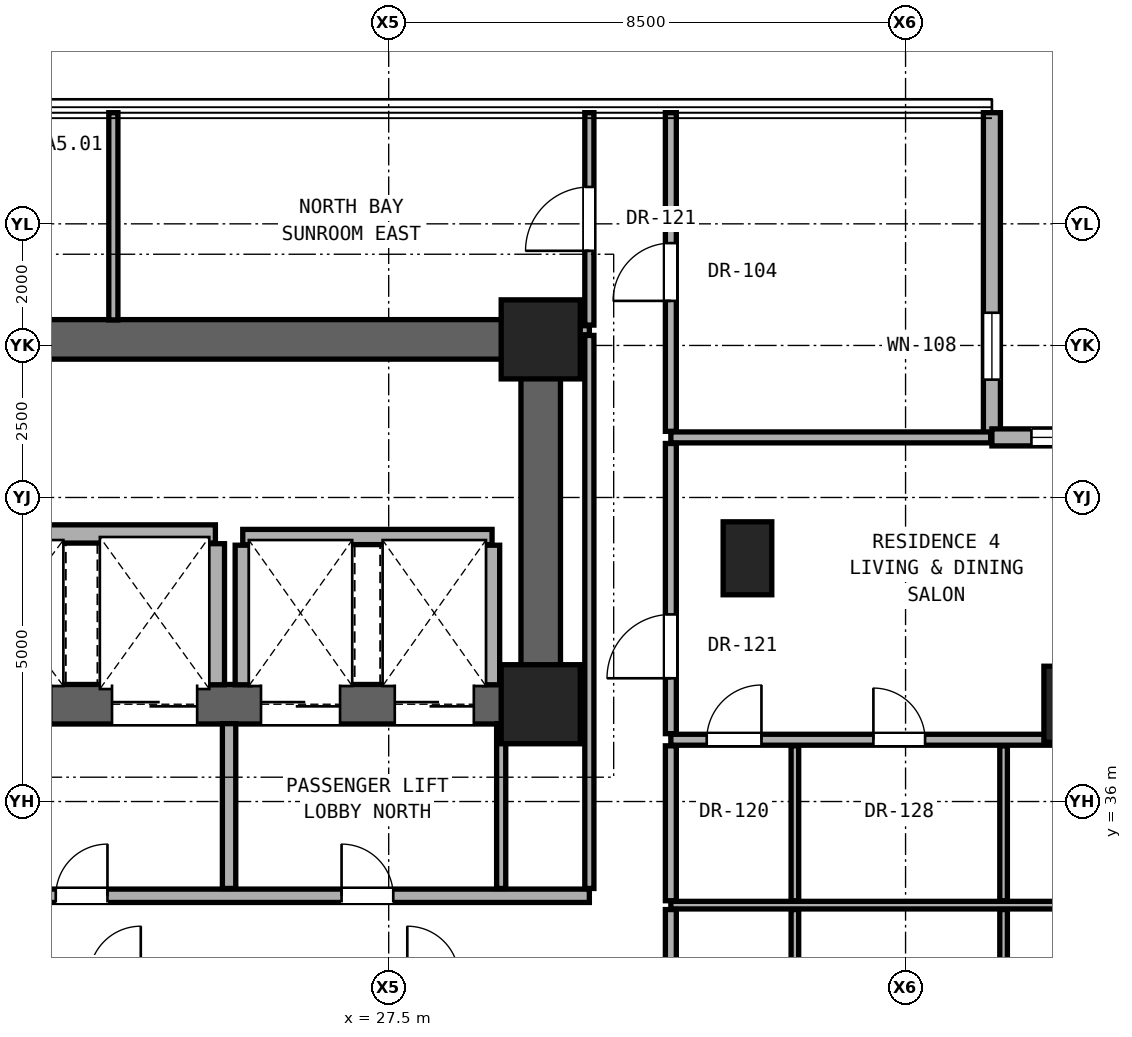
"""IFC4 building model, lengths in metres.
Left out: names, types, materials, properties, quantities, classifications, styles, units other than length and angle.
Written with IfcOpenShell. Run it as: python <this file> out.ifc"""

import sys

from ifc_helpers import new_model, si_unit, direction, frame, frame_2d, origin, origin_2d, place, context, subcontext, project, spatial, rectangle, hollow_rectangle, extrude, element, fill, save


model = new_model("IFC4")
c1 = context("Model", 3, precision=1e-05, world=origin(), true_north=direction((0.0, 1.0)))
c2 = subcontext(c1, "Body", "Model", "MODEL_VIEW")
j1 = project(units=[si_unit("LENGTHUNIT", "METRE"), si_unit("PLANEANGLEUNIT", "RADIAN")], contexts=[c1])
p1 = place(None, origin())
s1 = spatial("IfcSite", under=j1, at=p1, CompositionType="ELEMENT")
p2 = place(p1, origin())
s2 = spatial("IfcBuilding", under=s1, at=p2, CompositionType="ELEMENT")
p3 = place(p2, frame((0.0, 0.0, 71.9)))
s3 = spatial("IfcBuildingStorey", under=s2, at=p3, CompositionType="ELEMENT", Elevation=71.9)
for number, where, z_axis, x_axis in (
    (1, (30.0, 37.6, 0.0), (0.0, 0.0, 1.0), (1.0, 0.0, 0.0)),
    (2, (30.0, 43.6, 0.0), (0.0, 0.0, 1.0), (1.0, 0.0, 0.0)),
):
    element("IfcColumn", number, at=place(p3, frame(where, z_axis=z_axis, x_axis=x_axis)), inside=s3, PredefinedType="COLUMN", context=c2, shape_type="SweptSolid", body=[
        extrude(rectangle(XDim=1.3, YDim=1.3, at=origin_2d()), origin(), (0.0, 0.0, 1.0), 3.3),
    ])
p4 = place(p3, frame((38.9, 37.6, 0.0), z_axis=(0.0, 0.0, 1.0), x_axis=(1.0, 0.0, 0.0)))
e3 = element("IfcColumn", 3, at=p4, inside=s3, PredefinedType="COLUMN", context=c2, shape_type="SweptSolid", body=[
    extrude(hollow_rectangle(XDim=1.25, YDim=1.25, WallThickness=0.07, at=origin_2d()), origin(), (0.0, 0.0, 1.0), 3.3),
])
p5 = place(p3, frame((33.4, 40.0, 0.0), z_axis=(0.0, 0.0, 1.0), x_axis=(1.0, 0.0, 0.0)))
e4 = element("IfcColumn", 4, at=p5, inside=s3, PredefinedType="PILASTER", context=c2, shape_type="SweptSolid", body=[
    extrude(rectangle(XDim=0.8, YDim=1.2, at=origin_2d()), origin(), (0.0, 0.0, 1.0), 3.3),
])
p6 = place(p3, frame((11.0, 43.6, 0.0), z_axis=(0.0, 0.0, 1.0), x_axis=(1.0, 0.0, 0.0)))
e5 = element("IfcWall", 5, at=p6, inside=s3, PredefinedType="SHEAR", context=c2, shape_type="SweptSolid", body=[
    extrude(rectangle(XDim=19.0, YDim=0.65, at=frame_2d((9.5, 0.0))), origin(), (0.0, 0.0, 1.0), 3.06),
])
p7 = place(p3, frame((30.0, 37.6, 0.0), z_axis=(0.0, 0.0, 1.0), x_axis=(0.0, 1.0, 0.0)))
e6 = element("IfcWall", 6, at=p7, inside=s3, PredefinedType="SHEAR", context=c2, shape_type="SweptSolid", body=[
    extrude(rectangle(XDim=6.0, YDim=0.65, at=frame_2d((3.0, 0.0))), origin(), (0.0, 0.0, 1.0), 3.06),
])
p8 = place(p3, frame((11.0, 37.6, 0.0), z_axis=(0.0, 0.0, 1.0), x_axis=(1.0, 0.0, 0.0)))
e7 = element("IfcWall", 7, at=p8, inside=s3, PredefinedType="SHEAR", context=c2, shape_type="SweptSolid", body=[
    extrude(rectangle(XDim=19.0, YDim=0.65, at=frame_2d((9.5, 0.0))), origin(), (0.0, 0.0, 1.0), 3.06),
])
p9 = place(p8, frame((1.06, 0.0, 0.0)))
e8 = element("IfcOpeningElement", 8, at=p9, cuts=e7, PredefinedType="OPENING", context=c2, shape_type="SweptSolid", body=[
    extrude(rectangle(XDim=1.15, YDim=2.2, at=frame_2d((0.575, 1.1))), frame((0.0, 0.335, 0.0), z_axis=(0.0, -1.0, 0.0), x_axis=(1.0, 0.0, 0.0)), (0.0, 0.0, 1.0), 0.67),
])
p10 = place(p8, frame((9.55, 0.0, 0.0)))
e9 = element("IfcOpeningElement", 9, at=p10, cuts=e7, PredefinedType="OPENING", context=c2, shape_type="SweptSolid", body=[
    extrude(rectangle(XDim=1.4, YDim=2.35, at=frame_2d((0.7, 1.175))), frame((0.0, 0.335, 0.0), z_axis=(0.0, -1.0, 0.0), x_axis=(1.0, 0.0, 0.0)), (0.0, 0.0, 1.0), 0.67),
])
p11 = place(p8, frame((11.95, 0.0, 0.0)))
e10 = element("IfcOpeningElement", 10, at=p11, cuts=e7, PredefinedType="OPENING", context=c2, shape_type="SweptSolid", body=[
    extrude(rectangle(XDim=1.4, YDim=2.35, at=frame_2d((0.7, 1.175))), frame((0.0, 0.335, 0.0), z_axis=(0.0, -1.0, 0.0), x_axis=(1.0, 0.0, 0.0)), (0.0, 0.0, 1.0), 0.67),
])
p12 = place(p8, frame((14.4, 0.0, 0.0)))
e11 = element("IfcOpeningElement", 11, at=p12, cuts=e7, PredefinedType="OPENING", context=c2, shape_type="SweptSolid", body=[
    extrude(rectangle(XDim=1.3, YDim=2.3, at=frame_2d((0.65, 1.15))), frame((0.0, 0.335, 0.0), z_axis=(0.0, -1.0, 0.0), x_axis=(1.0, 0.0, 0.0)), (0.0, 0.0, 1.0), 0.67),
])
p13 = place(p8, frame((16.6, 0.0, 0.0)))
e12 = element("IfcOpeningElement", 12, at=p13, cuts=e7, PredefinedType="OPENING", context=c2, shape_type="SweptSolid", body=[
    extrude(rectangle(XDim=1.3, YDim=2.3, at=frame_2d((0.65, 1.15))), frame((0.0, 0.335, 0.0), z_axis=(0.0, -1.0, 0.0), x_axis=(1.0, 0.0, 0.0)), (0.0, 0.0, 1.0), 0.67),
])
p14 = place(p3, frame((37.42, 41.988, 0.0), z_axis=(0.0, 0.0, 1.0), x_axis=(0.0, 1.0, 0.0)))
e13 = element("IfcWall", 13, at=p14, inside=s3, PredefinedType="SOLIDWALL", context=c2, shape_type="SweptSolid", body=[
    extrude(rectangle(XDim=5.34, YDim=0.28, at=frame_2d((2.67, 0.0))), origin(), (0.0, 0.0, 1.0), 3.04),
])
p15 = place(p14, frame((0.95, 0.0, 0.85)))
e14 = element("IfcOpeningElement", 14, at=p15, cuts=e13, PredefinedType="OPENING", context=c2, shape_type="SweptSolid", body=[
    extrude(rectangle(XDim=1.1, YDim=2.0, at=frame_2d((0.55, 1.0))), frame((0.0, 0.15, 0.0), z_axis=(0.0, -1.0, 0.0), x_axis=(1.0, 0.0, 0.0)), (0.0, 0.0, 1.0), 0.3),
])
p16 = place(p3, frame((42.76, 41.988, 0.0), z_axis=(0.0, 0.0, 1.0), x_axis=(-1.0, 0.0, 0.0)))
e15 = element("IfcWall", 15, at=p16, inside=s3, PredefinedType="SOLIDWALL", context=c2, shape_type="SweptSolid", body=[
    extrude(rectangle(XDim=5.34, YDim=0.28, at=frame_2d((2.67, 0.0))), origin(), (0.0, 0.0, 1.0), 3.04),
])
p17 = place(p16, frame((3.59, 0.0, 0.85)))
e16 = element("IfcOpeningElement", 16, at=p17, cuts=e15, PredefinedType="OPENING", context=c2, shape_type="SweptSolid", body=[
    extrude(rectangle(XDim=1.1, YDim=2.0, at=frame_2d((0.55, 1.0))), frame((0.0, 0.15, 0.0), z_axis=(0.0, -1.0, 0.0), x_axis=(1.0, 0.0, 0.0)), (0.0, 0.0, 1.0), 0.3),
])
p18 = place(p3, frame((32.14, 34.296, 0.0), z_axis=(0.0, 0.0, 1.0), x_axis=(1.0, 0.0, 0.0)))
e17 = element("IfcWall", 17, at=p18, inside=s3, PredefinedType="PARTITIONING", context=c2, shape_type="SweptSolid", body=[
    extrude(rectangle(XDim=10.62, YDim=0.125, at=frame_2d((5.31, 0.0))), origin(), (0.0, 0.0, 1.0), 2.125),
])
p19 = place(p3, frame((15.59, 34.45, 0.0), z_axis=(0.0, 0.0, 1.0), x_axis=(1.0, 0.0, 0.0)))
e18 = element("IfcWall", 18, at=p19, inside=s3, PredefinedType="SOLIDWALL", context=c2, shape_type="SweptSolid", body=[
    extrude(rectangle(XDim=15.21, YDim=0.22, at=frame_2d((7.605, 0.0))), origin(), (0.0, 0.0, 1.0), 2.104),
])
p20 = place(p19, frame((6.435, 0.0, 0.0)))
e19 = element("IfcOpeningElement", 19, at=p20, cuts=e18, PredefinedType="OPENING", context=c2, shape_type="SweptSolid", body=[
    extrude(rectangle(XDim=0.85, YDim=2.01, at=frame_2d((0.425, 1.005))), frame((0.0, 0.12, 0.0), z_axis=(0.0, -1.0, 0.0), x_axis=(1.0, 0.0, 0.0)), (0.0, 0.0, 1.0), 0.24),
])
p21 = place(p19, frame((11.135, 0.0, 0.0)))
e20 = element("IfcOpeningElement", 20, at=p21, cuts=e18, PredefinedType="OPENING", context=c2, shape_type="SweptSolid", body=[
    extrude(rectangle(XDim=0.85, YDim=2.01, at=frame_2d((0.425, 1.005))), frame((0.0, 0.12, 0.0), z_axis=(0.0, -1.0, 0.0), x_axis=(1.0, 0.0, 0.0)), (0.0, 0.0, 1.0), 0.24),
])
p22 = place(p19, frame((0.675, 0.0, 0.0)))
e21 = element("IfcOpeningElement", 21, at=p22, cuts=e18, PredefinedType="OPENING", context=c2, shape_type="SweptSolid", body=[
    extrude(rectangle(XDim=0.85, YDim=2.01, at=frame_2d((0.425, 1.005))), frame((0.0, 0.12, 0.0), z_axis=(0.0, -1.0, 0.0), x_axis=(1.0, 0.0, 0.0)), (0.0, 0.0, 1.0), 0.24),
])
p23 = place(p19, frame((2.835, 0.0, 0.0)))
e22 = element("IfcOpeningElement", 22, at=p23, cuts=e18, PredefinedType="OPENING", context=c2, shape_type="SweptSolid", body=[
    extrude(rectangle(XDim=0.85, YDim=2.01, at=frame_2d((0.425, 1.005))), frame((0.0, 0.12, 0.0), z_axis=(0.0, -1.0, 0.0), x_axis=(1.0, 0.0, 0.0)), (0.0, 0.0, 1.0), 0.24),
])
p24 = place(p3, frame((32.14, 37.016, 0.0), z_axis=(0.0, 0.0, 1.0), x_axis=(1.0, 0.0, 0.0)))
e23 = element("IfcWall", 23, at=p24, inside=s3, PredefinedType="PARTITIONING", context=c2, shape_type="SweptSolid", body=[
    extrude(rectangle(XDim=10.62, YDim=0.18, at=frame_2d((5.31, 0.0))), origin(), (0.0, 0.0, 1.0), 2.125),
])
p25 = place(p24, frame((7.601, 0.0, 0.0)))
e24 = element("IfcOpeningElement", 24, at=p25, cuts=e23, PredefinedType="OPENING", context=c2, shape_type="SweptSolid", body=[
    extrude(rectangle(XDim=0.85, YDim=2.01, at=frame_2d((0.425, 1.005))), frame((0.0, 0.1, 0.0), z_axis=(0.0, -1.0, 0.0), x_axis=(1.0, 0.0, 0.0)), (0.0, 0.0, 1.0), 0.2),
])
p26 = place(p24, frame((3.331, 0.0, 0.0)))
e25 = element("IfcOpeningElement", 25, at=p26, cuts=e23, PredefinedType="OPENING", context=c2, shape_type="SweptSolid", body=[
    extrude(rectangle(XDim=0.85, YDim=2.01, at=frame_2d((0.425, 1.005))), frame((0.0, 0.1, 0.0), z_axis=(0.0, -1.0, 0.0), x_axis=(1.0, 0.0, 0.0)), (0.0, 0.0, 1.0), 0.2),
])
p27 = place(p24, frame((0.59, 0.0, 0.0)))
e26 = element("IfcOpeningElement", 26, at=p27, cuts=e23, PredefinedType="OPENING", context=c2, shape_type="SweptSolid", body=[
    extrude(rectangle(XDim=0.9, YDim=2.1, at=frame_2d((0.45, 1.05))), frame((0.0, 0.1, 0.0), z_axis=(0.0, -1.0, 0.0), x_axis=(1.0, 0.0, 0.0)), (0.0, 0.0, 1.0), 0.2),
])
p28 = place(p3, frame((25.1, 40.35, 0.0), z_axis=(0.0, 0.0, 1.0), x_axis=(1.0, 0.0, 0.0)))
e27 = element("IfcWall", 27, at=p28, inside=s3, PredefinedType="SOLIDWALL", context=c2, shape_type="SweptSolid", body=[
    extrude(rectangle(XDim=4.1, YDim=0.25, at=frame_2d((2.05, 0.0))), origin(), (0.0, 0.0, 1.0), 3.06),
])
p29 = place(p3, frame((20.25, 40.4, 0.0), z_axis=(0.0, 0.0, 1.0), x_axis=(1.0, 0.0, 0.0)))
e28 = element("IfcWall", 28, at=p29, inside=s3, PredefinedType="SOLIDWALL", context=c2, shape_type="SweptSolid", body=[
    extrude(rectangle(XDim=4.4, YDim=0.3, at=frame_2d((2.2, 0.0))), origin(), (0.0, 0.0, 1.0), 3.06),
])
p30 = place(p3, frame((32.14, 41.988, 0.0), z_axis=(0.0, 0.0, 1.0), x_axis=(1.0, 0.0, 0.0)))
e29 = element("IfcWall", 29, at=p30, inside=s3, PredefinedType="PARTITIONING", context=c2, shape_type="SweptSolid", body=[
    extrude(rectangle(XDim=5.26, YDim=0.18, at=frame_2d((2.63, 0.0))), origin(), (0.0, 0.0, 1.0), 3.06),
])
p31 = place(p3, frame((30.32, 43.75, 0.0), z_axis=(0.0, 0.0, 1.0), x_axis=(1.0, 0.0, 0.0)))
e30 = element("IfcWall", 30, at=p31, inside=s3, PredefinedType="PARTITIONING", context=c2, shape_type="SweptSolid", body=[
    extrude(rectangle(XDim=0.48, YDim=0.15, at=frame_2d((0.24, 0.0))), origin(), (0.0, 0.0, 1.0), 3.06),
])
p32 = place(p3, frame((22.972, 43.92, 0.0), z_axis=(0.0, 0.0, 1.0), x_axis=(0.0, 1.0, 0.0)))
e31 = element("IfcWall", 31, at=p32, inside=s3, PredefinedType="PARTITIONING", context=c2, shape_type="SweptSolid", body=[
    extrude(rectangle(XDim=3.408, YDim=0.15, at=frame_2d((1.704, 0.0))), origin(), (0.0, 0.0, 1.0), 3.06),
])
p33 = place(p3, frame((24.65, 37.92, 0.0), z_axis=(0.0, 0.0, 1.0), x_axis=(0.0, 1.0, 0.0)))
e32 = element("IfcWall", 32, at=p33, inside=s3, PredefinedType="SOLIDWALL", context=c2, shape_type="SweptSolid", body=[
    extrude(rectangle(XDim=2.32, YDim=0.3, at=frame_2d((1.16, 0.0))), origin(), (0.0, 0.0, 1.0), 3.06),
])
p34 = place(p3, frame((24.875, 34.57, 0.0), z_axis=(0.0, 0.0, 1.0), x_axis=(0.0, 1.0, 0.0)))
e33 = element("IfcWall", 33, at=p34, inside=s3, PredefinedType="SOLIDWALL", context=c2, shape_type="SweptSolid", body=[
    extrude(rectangle(XDim=2.71, YDim=0.22, at=frame_2d((1.355, 0.0))), origin(), (0.0, 0.0, 1.0), 3.06),
])
p35 = place(p3, frame((25.1, 37.92, 0.0), z_axis=(0.0, 0.0, 1.0), x_axis=(0.0, 1.0, 0.0)))
e34 = element("IfcWall", 34, at=p35, inside=s3, PredefinedType="SOLIDWALL", context=c2, shape_type="SweptSolid", body=[
    extrude(rectangle(XDim=2.295, YDim=0.25, at=frame_2d((1.147, 0.0))), origin(), (0.0, 0.0, 1.0), 3.06),
])
p36 = place(p3, frame((29.35, 34.57, 0.0), z_axis=(0.0, 0.0, 1.0), x_axis=(0.0, 1.0, 0.0)))
e35 = element("IfcWall", 35, at=p36, inside=s3, PredefinedType="PARTITIONING", context=c2, shape_type="SweptSolid", body=[
    extrude(rectangle(XDim=2.71, YDim=0.15, at=frame_2d((1.355, 0.0))), origin(), (0.0, 0.0, 1.0), 3.06),
])
p37 = place(p3, frame((29.2, 37.92, 0.0), z_axis=(0.0, 0.0, 1.0), x_axis=(0.0, 1.0, 0.0)))
e36 = element("IfcWall", 36, at=p37, inside=s3, PredefinedType="SOLIDWALL", context=c2, shape_type="SweptSolid", body=[
    extrude(rectangle(XDim=2.295, YDim=0.25, at=frame_2d((1.147, 0.0))), origin(), (0.0, 0.0, 1.0), 3.06),
])
p38 = place(p3, frame((30.8, 34.57, 0.0), z_axis=(0.0, 0.0, 1.0), x_axis=(0.0, 1.0, 0.0)))
e37 = element("IfcWall", 37, at=p38, inside=s3, PredefinedType="PARTITIONING", context=c2, shape_type="SweptSolid", body=[
    extrude(rectangle(XDim=9.095, YDim=0.15, at=frame_2d((4.547, 0.0))), origin(), (0.0, 0.0, 1.0), 2.436),
])
p39 = place(p3, frame((30.8, 43.835, 0.0), z_axis=(0.0, 0.0, 1.0), x_axis=(0.0, 1.0, 0.0)))
e38 = element("IfcWall", 38, at=p39, inside=s3, PredefinedType="PARTITIONING", context=c2, shape_type="SweptSolid", body=[
    extrude(rectangle(XDim=3.493, YDim=0.15, at=frame_2d((1.747, 0.0))), origin(), (0.0, 0.0, 1.0), 3.06),
])
p40 = place(p39, frame((1.221, 0.0, 0.0)))
e39 = element("IfcOpeningElement", 39, at=p40, cuts=e38, PredefinedType="OPENING", context=c2, shape_type="SweptSolid", body=[
    extrude(rectangle(XDim=1.05, YDim=2.2, at=frame_2d((0.525, 1.1))), frame((0.0, 0.085, 0.0), z_axis=(0.0, -1.0, 0.0), x_axis=(1.0, 0.0, 0.0)), (0.0, 0.0, 1.0), 0.17),
])
p41 = place(p3, frame((32.14, 32.476, 0.0), z_axis=(0.0, 0.0, 1.0), x_axis=(0.0, 1.0, 0.0)))
e40 = element("IfcWall", 40, at=p41, inside=s3, PredefinedType="PARTITIONING", context=c2, shape_type="SweptSolid", body=[
    extrude(rectangle(XDim=1.747, YDim=0.18, at=frame_2d((0.874, 0.0))), origin(), (0.0, 0.0, 1.0), 3.06),
])
p42 = place(p3, frame((32.14, 34.368, 0.0), z_axis=(0.0, 0.0, 1.0), x_axis=(0.0, 1.0, 0.0)))
e41 = element("IfcWall", 41, at=p42, inside=s3, PredefinedType="PARTITIONING", context=c2, shape_type="SweptSolid", body=[
    extrude(rectangle(XDim=2.548, YDim=0.18, at=frame_2d((1.274, 0.0))), origin(), (0.0, 0.0, 1.0), 3.06),
])
p43 = place(p3, frame((32.14, 37.116, 0.0), z_axis=(0.0, 0.0, 1.0), x_axis=(0.0, 1.0, 0.0)))
e42 = element("IfcWall", 42, at=p43, inside=s3, PredefinedType="PARTITIONING", context=c2, shape_type="SweptSolid", body=[
    extrude(rectangle(XDim=4.772, YDim=0.18, at=frame_2d((2.386, 0.0))), origin(), (0.0, 0.0, 1.0), 2.436),
])
p44 = place(p43, frame((0.911, 0.0, 0.0)))
e43 = element("IfcOpeningElement", 43, at=p44, cuts=e42, PredefinedType="OPENING", context=c2, shape_type="SweptSolid", body=[
    extrude(rectangle(XDim=1.05, YDim=2.2, at=frame_2d((0.525, 1.1))), frame((0.0, 0.1, 0.0), z_axis=(0.0, -1.0, 0.0), x_axis=(1.0, 0.0, 0.0)), (0.0, 0.0, 1.0), 0.2),
])
p45 = place(p3, frame((32.14, 42.088, 0.0), z_axis=(0.0, 0.0, 1.0), x_axis=(0.0, 1.0, 0.0)))
e44 = element("IfcWall", 44, at=p45, inside=s3, PredefinedType="PARTITIONING", context=c2, shape_type="SweptSolid", body=[
    extrude(rectangle(XDim=5.24, YDim=0.18, at=frame_2d((2.62, 0.0))), origin(), (0.0, 0.0, 1.0), 3.06),
])
p46 = place(p45, frame((2.145, 0.0, 0.0)))
e45 = element("IfcOpeningElement", 45, at=p46, cuts=e44, PredefinedType="OPENING", context=c2, shape_type="SweptSolid", body=[
    extrude(rectangle(XDim=0.95, YDim=2.15, at=frame_2d((0.475, 1.075))), frame((0.0, 0.1, 0.0), z_axis=(0.0, -1.0, 0.0), x_axis=(1.0, 0.0, 0.0)), (0.0, 0.0, 1.0), 0.2),
])
p47 = place(p3, frame((34.18, 32.476, 0.0), z_axis=(0.0, 0.0, 1.0), x_axis=(0.0, 1.0, 0.0)))
e46 = element("IfcWall", 46, at=p47, inside=s3, PredefinedType="PARTITIONING", context=c2, shape_type="SweptSolid", body=[
    extrude(rectangle(XDim=1.747, YDim=0.125, at=frame_2d((0.874, 0.0))), origin(), (0.0, 0.0, 1.0), 3.06),
])
p48 = place(p3, frame((34.18, 34.368, 0.0), z_axis=(0.0, 0.0, 1.0), x_axis=(0.0, 1.0, 0.0)))
e47 = element("IfcWall", 47, at=p48, inside=s3, PredefinedType="PARTITIONING", context=c2, shape_type="SweptSolid", body=[
    extrude(rectangle(XDim=2.548, YDim=0.125, at=frame_2d((1.274, 0.0))), origin(), (0.0, 0.0, 1.0), 3.06),
])
p49 = place(p3, frame((37.612, 32.476, 0.0), z_axis=(0.0, 0.0, 1.0), x_axis=(0.0, 1.0, 0.0)))
e48 = element("IfcWall", 48, at=p49, inside=s3, PredefinedType="PARTITIONING", context=c2, shape_type="SweptSolid", body=[
    extrude(rectangle(XDim=1.747, YDim=0.125, at=frame_2d((0.874, 0.0))), origin(), (0.0, 0.0, 1.0), 3.06),
])
p50 = place(p3, frame((37.612, 34.368, 0.0), z_axis=(0.0, 0.0, 1.0), x_axis=(0.0, 1.0, 0.0)))
e49 = element("IfcWall", 49, at=p50, inside=s3, PredefinedType="PARTITIONING", context=c2, shape_type="SweptSolid", body=[
    extrude(rectangle(XDim=2.548, YDim=0.125, at=frame_2d((1.274, 0.0))), origin(), (0.0, 0.0, 1.0), 3.06),
])
p51 = place(p15, origin())
e50 = element("IfcWindow", 50, at=p51, inside=s3, PartitioningType="SINGLE_PANEL", PredefinedType="WINDOW", context=c2, shape_type="SweptSolid", body=[
    extrude(rectangle(XDim=1.1, YDim=2.0, at=frame_2d((0.55, 1.0))), frame((0.0, 0.03, 0.0), z_axis=(0.0, -1.0, 0.0), x_axis=(1.0, 0.0, 0.0)), (0.0, 0.0, 1.0), 0.06),
])
fill(e14, e50)
p52 = place(p17, origin())
e51 = element("IfcWindow", 51, at=p52, inside=s3, PartitioningType="SINGLE_PANEL", PredefinedType="WINDOW", context=c2, shape_type="SweptSolid", body=[
    extrude(rectangle(XDim=1.1, YDim=2.0, at=frame_2d((0.55, 1.0))), frame((0.0, 0.03, 0.0), z_axis=(0.0, -1.0, 0.0), x_axis=(1.0, 0.0, 0.0)), (0.0, 0.0, 1.0), 0.06),
])
fill(e16, e51)
p53 = place(p20, origin())
e52 = element("IfcDoor", 52, at=p53, inside=s3, OperationType="SINGLE_SWING_RIGHT", PredefinedType="DOOR", context=c2, shape_type="SweptSolid", body=[
    extrude(rectangle(XDim=0.85, YDim=2.01, at=frame_2d((0.425, 1.005))), frame((0.0, 0.025, 0.0), z_axis=(0.0, -1.0, 0.0), x_axis=(1.0, 0.0, 0.0)), (0.0, 0.0, 1.0), 0.05),
])
fill(e19, e52)
p54 = place(p21, origin())
e53 = element("IfcDoor", 53, at=p54, inside=s3, OperationType="SINGLE_SWING_LEFT", PredefinedType="DOOR", context=c2, shape_type="SweptSolid", body=[
    extrude(rectangle(XDim=0.85, YDim=2.01, at=frame_2d((0.425, 1.005))), frame((0.0, 0.025, 0.0), z_axis=(0.0, -1.0, 0.0), x_axis=(1.0, 0.0, 0.0)), (0.0, 0.0, 1.0), 0.05),
])
fill(e20, e53)
p55 = place(p44, origin())
e54 = element("IfcDoor", 54, at=p55, inside=s3, OperationType="SINGLE_SWING_LEFT", PredefinedType="DOOR", context=c2, shape_type="SweptSolid", body=[
    extrude(rectangle(XDim=1.05, YDim=2.2, at=frame_2d((0.525, 1.1))), frame((0.0, 0.025, 0.0), z_axis=(0.0, -1.0, 0.0), x_axis=(1.0, 0.0, 0.0)), (0.0, 0.0, 1.0), 0.05),
])
fill(e43, e54)
p56 = place(p26, origin())
e55 = element("IfcDoor", 55, at=p56, inside=s3, OperationType="SINGLE_SWING_LEFT", PredefinedType="DOOR", context=c2, shape_type="SweptSolid", body=[
    extrude(rectangle(XDim=0.85, YDim=2.01, at=frame_2d((0.425, 1.005))), frame((0.0, 0.025, 0.0), z_axis=(0.0, -1.0, 0.0), x_axis=(1.0, 0.0, 0.0)), (0.0, 0.0, 1.0), 0.05),
])
fill(e25, e55)
p57 = place(p27, origin())
e56 = element("IfcDoor", 56, at=p57, inside=s3, OperationType="SINGLE_SWING_RIGHT", PredefinedType="DOOR", context=c2, shape_type="SweptSolid", body=[
    extrude(rectangle(XDim=0.9, YDim=2.1, at=frame_2d((0.45, 1.05))), frame((0.0, 0.025, 0.0), z_axis=(0.0, -1.0, 0.0), x_axis=(1.0, 0.0, 0.0)), (0.0, 0.0, 1.0), 0.05),
])
fill(e26, e56)
p58 = place(p40, origin())
e57 = element("IfcDoor", 57, at=p58, inside=s3, OperationType="SINGLE_SWING_LEFT", PredefinedType="DOOR", context=c2, shape_type="SweptSolid", body=[
    extrude(rectangle(XDim=1.05, YDim=2.2, at=frame_2d((0.525, 1.1))), frame((0.0, 0.025, 0.0), z_axis=(0.0, -1.0, 0.0), x_axis=(1.0, 0.0, 0.0)), (0.0, 0.0, 1.0), 0.05),
])
fill(e39, e57)
p59 = place(p46, origin())
e58 = element("IfcDoor", 58, at=p59, inside=s3, OperationType="SINGLE_SWING_LEFT", PredefinedType="DOOR", context=c2, shape_type="SweptSolid", body=[
    extrude(rectangle(XDim=0.95, YDim=2.15, at=frame_2d((0.475, 1.075))), frame((0.0, 0.025, 0.0), z_axis=(0.0, -1.0, 0.0), x_axis=(1.0, 0.0, 0.0)), (0.0, 0.0, 1.0), 0.05),
])
fill(e45, e58)
p60 = place(p11, origin())
e59 = element("IfcDoor", 59, at=p60, inside=s3, OperationType="DOUBLE_DOOR_SLIDING", PredefinedType="DOOR", context=c2, shape_type="SweptSolid", body=[
    extrude(rectangle(XDim=1.4, YDim=2.35, at=frame_2d((0.7, 1.175))), frame((0.0, 0.025, 0.0), z_axis=(0.0, -1.0, 0.0), x_axis=(1.0, 0.0, 0.0)), (0.0, 0.0, 1.0), 0.05),
])
fill(e10, e59)
p61 = place(p12, origin())
e60 = element("IfcDoor", 60, at=p61, inside=s3, OperationType="DOUBLE_DOOR_SLIDING", PredefinedType="DOOR", context=c2, shape_type="SweptSolid", body=[
    extrude(rectangle(XDim=1.3, YDim=2.3, at=frame_2d((0.65, 1.15))), frame((0.0, 0.025, 0.0), z_axis=(0.0, -1.0, 0.0), x_axis=(1.0, 0.0, 0.0)), (0.0, 0.0, 1.0), 0.05),
])
fill(e11, e60)
p62 = place(p13, origin())
e61 = element("IfcDoor", 61, at=p62, inside=s3, OperationType="DOUBLE_DOOR_SLIDING", PredefinedType="DOOR", context=c2, shape_type="SweptSolid", body=[
    extrude(rectangle(XDim=1.3, YDim=2.3, at=frame_2d((0.65, 1.15))), frame((0.0, 0.025, 0.0), z_axis=(0.0, -1.0, 0.0), x_axis=(1.0, 0.0, 0.0)), (0.0, 0.0, 1.0), 0.05),
])
fill(e12, e61)
save(model, sys.argv[1])
